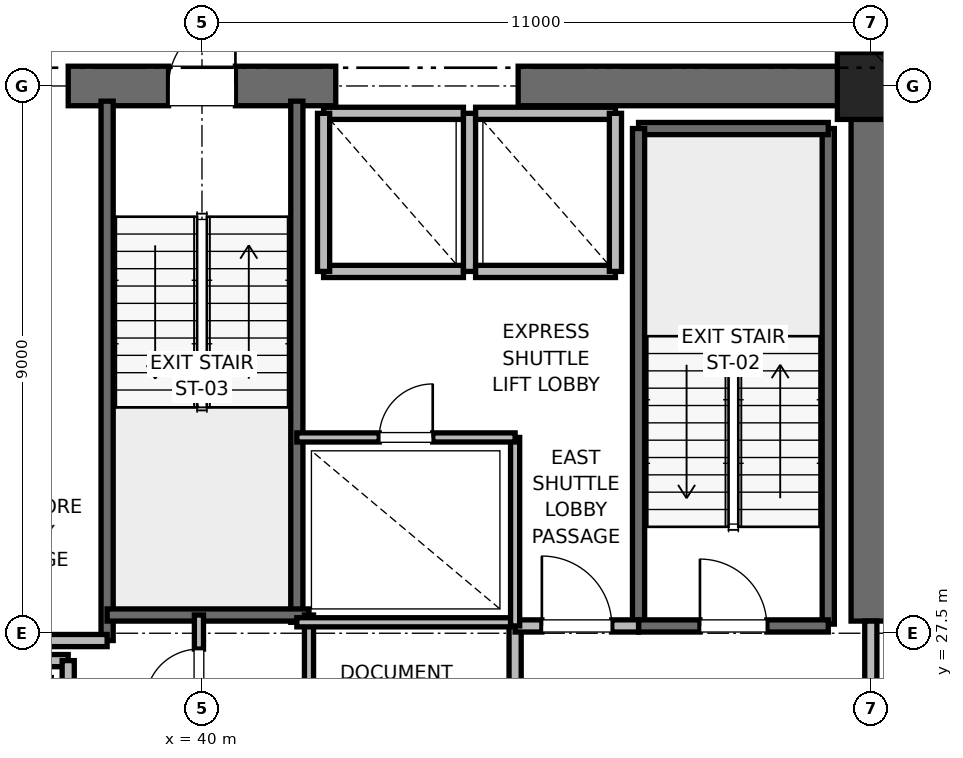
"""IFC4 building model, lengths in metres.
Left out: names, types, materials, properties, quantities, classifications, styles, units other than length and angle.
Written with IfcOpenShell. Run it as: python <this file> out.ifc"""

import sys

from ifc_helpers import new_model, si_unit, direction, frame, frame_2d, origin, origin_2d, place, context, subcontext, project, spatial, rectangle, extrude, element, fill, save


model = new_model("IFC4")
c1 = context("Model", 3, precision=1e-05, world=origin(), true_north=direction((0.0, 1.0)))
c2 = subcontext(c1, "Body", "Model", "MODEL_VIEW")
j1 = project(units=[si_unit("LENGTHUNIT", "METRE"), si_unit("PLANEANGLEUNIT", "RADIAN")], contexts=[c1])
p1 = place(None, origin())
s1 = spatial("IfcSite", under=j1, at=p1, CompositionType="ELEMENT")
p2 = place(p1, origin())
s2 = spatial("IfcBuilding", under=s1, at=p2, CompositionType="ELEMENT")
p3 = place(p2, frame((0.0, 0.0, 55.6)))
s3 = spatial("IfcBuildingStorey", under=s2, at=p3, CompositionType="ELEMENT", Elevation=55.6)
p4 = place(p3, frame((51.0, 36.5, 0.0), z_axis=(0.0, 0.0, 1.0), x_axis=(1.0, 0.0, 0.0)))
e1 = element("IfcColumn", 1, at=p4, inside=s3, PredefinedType="PILASTER", context=c2, shape_type="SweptSolid", body=[
    extrude(rectangle(XDim=1.1, YDim=1.1, at=origin_2d()), origin(), (0.0, 0.0, 1.0), 4.0),
])
p5 = place(p3, frame((37.8, 36.5, 0.0), z_axis=(0.0, 0.0, 1.0), x_axis=(1.0, 0.0, 0.0)))
e2 = element("IfcWall", 2, at=p5, inside=s3, PredefinedType="SHEAR", context=c2, shape_type="SweptSolid", body=[
    extrude(rectangle(XDim=4.4, YDim=0.65, at=frame_2d((2.2, 0.0))), origin(), (0.0, 0.0, 1.0), 3.76),
])
p6 = place(p5, frame((1.65, 0.0, 0.0)))
e3 = element("IfcOpeningElement", 3, at=p6, cuts=e2, PredefinedType="OPENING", context=c2, shape_type="SweptSolid", body=[
    extrude(rectangle(XDim=1.1, YDim=2.15, at=frame_2d((0.55, 1.075))), frame((0.0, 0.325, 0.0), z_axis=(0.0, -1.0, 0.0), x_axis=(1.0, 0.0, 0.0)), (0.0, 0.0, 1.0), 0.65),
])
p7 = place(p3, frame((45.2, 36.5, 0.0), z_axis=(0.0, 0.0, 1.0), x_axis=(1.0, 0.0, 0.0)))
e4 = element("IfcWall", 4, at=p7, inside=s3, PredefinedType="SHEAR", context=c2, shape_type="SweptSolid", body=[
    extrude(rectangle(XDim=5.8, YDim=0.65, at=frame_2d((2.9, 0.0))), origin(), (0.0, 0.0, 1.0), 3.76),
])
p8 = place(p3, frame((51.0, 27.7, 0.0), z_axis=(0.0, 0.0, 1.0), x_axis=(0.0, 1.0, 0.0)))
e5 = element("IfcWall", 5, at=p8, inside=s3, PredefinedType="SHEAR", context=c2, shape_type="SweptSolid", body=[
    extrude(rectangle(XDim=8.8, YDim=0.65, at=frame_2d((4.4, 0.0))), origin(), (0.0, 0.0, 1.0), 3.76),
])
p9 = place(p3, frame((50.3, 27.65, 0.0), z_axis=(0.0, 0.0, 1.0), x_axis=(0.0, 1.0, 0.0)))
e6 = element("IfcWall", 6, at=p9, inside=s3, PredefinedType="SOLIDWALL", context=c2, shape_type="SweptSolid", body=[
    extrude(rectangle(XDim=8.15, YDim=0.2, at=frame_2d((4.075, 0.0))), origin(), (0.0, 0.0, 1.0), 3.76),
])
p10 = place(p3, frame((47.18, 35.8, 0.0), z_axis=(0.0, 0.0, 1.0), x_axis=(1.0, 0.0, 0.0)))
e7 = element("IfcWall", 7, at=p10, inside=s3, PredefinedType="SOLIDWALL", context=c2, shape_type="SweptSolid", body=[
    extrude(rectangle(XDim=3.12, YDim=0.2, at=frame_2d((1.56, 0.0))), origin(), (0.0, 0.0, 1.0), 3.76),
])
p11 = place(p3, frame((47.18, 27.62, 0.0), z_axis=(0.0, 0.0, 1.0), x_axis=(0.0, 1.0, 0.0)))
e8 = element("IfcWall", 8, at=p11, inside=s3, PredefinedType="SOLIDWALL", context=c2, shape_type="SweptSolid", body=[
    extrude(rectangle(XDim=8.18, YDim=0.2, at=frame_2d((4.09, 0.0))), origin(), (0.0, 0.0, 1.0), 3.76),
])
p12 = place(p3, frame((47.18, 27.62, 0.0), z_axis=(0.0, 0.0, 1.0), x_axis=(1.0, 0.0, 0.0)))
e9 = element("IfcWall", 9, at=p12, inside=s3, PredefinedType="SOLIDWALL", context=c2, shape_type="SweptSolid", body=[
    extrude(rectangle(XDim=3.12, YDim=0.2, at=frame_2d((1.56, 0.0))), origin(), (0.0, 0.0, 1.0), 3.76),
])
p13 = place(p12, frame((1.01, 0.0, 0.0)))
e10 = element("IfcOpeningElement", 10, at=p13, cuts=e9, PredefinedType="OPENING", context=c2, shape_type="SweptSolid", body=[
    extrude(rectangle(XDim=1.1, YDim=2.15, at=frame_2d((0.55, 1.075))), frame((0.0, 0.1, 0.0), z_axis=(0.0, -1.0, 0.0), x_axis=(1.0, 0.0, 0.0)), (0.0, 0.0, 1.0), 0.2),
])
p14 = place(p3, frame((38.44, 27.38, 0.0), z_axis=(0.0, 0.0, 1.0), x_axis=(0.0, 1.0, 0.0)))
e11 = element("IfcWall", 11, at=p14, inside=s3, PredefinedType="SOLIDWALL", context=c2, shape_type="SweptSolid", body=[
    extrude(rectangle(XDim=8.87, YDim=0.2, at=frame_2d((4.435, 0.0))), origin(), (0.0, 0.0, 1.0), 3.76),
])
p15 = place(p3, frame((41.56, 27.68, 0.0), z_axis=(0.0, 0.0, 1.0), x_axis=(0.0, 1.0, 0.0)))
e12 = element("IfcWall", 12, at=p15, inside=s3, PredefinedType="SOLIDWALL", context=c2, shape_type="SweptSolid", body=[
    extrude(rectangle(XDim=8.57, YDim=0.2, at=frame_2d((4.285, 0.0))), origin(), (0.0, 0.0, 1.0), 3.76),
])
p16 = place(p3, frame((38.44, 27.8, 0.0), z_axis=(0.0, 0.0, 1.0), x_axis=(1.0, 0.0, 0.0)))
e13 = element("IfcWall", 13, at=p16, inside=s3, PredefinedType="SOLIDWALL", context=c2, shape_type="SweptSolid", body=[
    extrude(rectangle(XDim=3.32, YDim=0.2, at=frame_2d((1.66, 0.0))), origin(), (0.0, 0.0, 1.0), 3.76),
])
p17 = place(p3, frame((32.82, 27.38, 0.0), z_axis=(0.0, 0.0, 1.0), x_axis=(1.0, 0.0, 0.0)))
e14 = element("IfcWall", 14, at=p17, inside=s3, PredefinedType="PARTITIONING", context=c2, shape_type="SweptSolid", body=[
    extrude(rectangle(XDim=5.62, YDim=0.2, at=frame_2d((2.81, 0.0))), origin(), (0.0, 0.0, 1.0), 3.76),
])
p18 = place(p3, frame((45.15, 24.25, 0.0), z_axis=(0.0, 0.0, 1.0), x_axis=(0.0, 1.0, 0.0)))
e15 = element("IfcWall", 15, at=p18, inside=s3, PredefinedType="PARTITIONING", context=c2, shape_type="SweptSolid", body=[
    extrude(rectangle(XDim=3.37, YDim=0.2, at=frame_2d((1.685, 0.0))), origin(), (0.0, 0.0, 1.0), 3.76),
])
p19 = place(p3, frame((45.15, 27.62, 0.0), z_axis=(0.0, 0.0, 1.0), x_axis=(1.0, 0.0, 0.0)))
e16 = element("IfcWall", 16, at=p19, inside=s3, PredefinedType="PARTITIONING", context=c2, shape_type="SweptSolid", body=[
    extrude(rectangle(XDim=2.03, YDim=0.2, at=frame_2d((1.015, 0.0))), origin(), (0.0, 0.0, 1.0), 3.76),
])
p20 = place(p19, frame((0.44, 0.0, 0.0)))
e17 = element("IfcOpeningElement", 17, at=p20, cuts=e16, PredefinedType="OPENING", context=c2, shape_type="SweptSolid", body=[
    extrude(rectangle(XDim=1.15, YDim=2.2, at=frame_2d((0.575, 1.1))), frame((0.0, 0.1, 0.0), z_axis=(0.0, -1.0, 0.0), x_axis=(1.0, 0.0, 0.0)), (0.0, 0.0, 1.0), 0.2),
])
p21 = place(p3, frame((51.0, 24.3, 0.0), z_axis=(0.0, 0.0, 1.0), x_axis=(0.0, 1.0, 0.0)))
e18 = element("IfcWall", 18, at=p21, inside=s3, PredefinedType="PARTITIONING", context=c2, shape_type="SweptSolid", body=[
    extrude(rectangle(XDim=3.4, YDim=0.2, at=frame_2d((1.7, 0.0))), origin(), (0.0, 0.0, 1.0), 2.54),
])
p22 = place(p21, frame((1.125, 0.0, 0.0)))
e19 = element("IfcOpeningElement", 19, at=p22, cuts=e18, PredefinedType="OPENING", context=c2, shape_type="SweptSolid", body=[
    extrude(rectangle(XDim=1.15, YDim=2.2, at=frame_2d((0.575, 1.1))), frame((0.0, 0.1, 0.0), z_axis=(0.0, -1.0, 0.0), x_axis=(1.0, 0.0, 0.0)), (0.0, 0.0, 1.0), 0.2),
])
p23 = place(p3, frame((37.8, 27.05, 0.0), z_axis=(0.0, 0.0, 1.0), x_axis=(-1.0, 0.0, 0.0)))
e20 = element("IfcWall", 20, at=p23, inside=s3, PredefinedType="SOLIDWALL", context=c2, shape_type="SweptSolid", body=[
    extrude(rectangle(XDim=2.3, YDim=0.2, at=frame_2d((1.15, 0.0))), origin(), (0.0, 0.0, 1.0), 3.76),
])
p24 = place(p3, frame((37.8, 24.45, 0.0), z_axis=(0.0, 0.0, 1.0), x_axis=(0.0, 1.0, 0.0)))
e21 = element("IfcWall", 21, at=p24, inside=s3, PredefinedType="SOLIDWALL", context=c2, shape_type="SweptSolid", body=[
    extrude(rectangle(XDim=2.6, YDim=0.2, at=frame_2d((1.3, 0.0))), origin(), (0.0, 0.0, 1.0), 3.76),
])
p25 = place(p3, frame((42.0, 33.45, 0.0), z_axis=(0.0, 0.0, 1.0), x_axis=(1.0, 0.0, 0.0)))
e22 = element("IfcWall", 22, at=p25, inside=s3, PredefinedType="SOLIDWALL", context=c2, shape_type="SweptSolid", body=[
    extrude(rectangle(XDim=2.3, YDim=0.2, at=frame_2d((1.15, 0.0))), origin(), (0.0, 0.0, 1.0), 3.76),
])
p26 = place(p3, frame((44.3, 36.05, 0.0), z_axis=(0.0, 0.0, 1.0), x_axis=(-1.0, 0.0, 0.0)))
e23 = element("IfcWall", 23, at=p26, inside=s3, PredefinedType="SOLIDWALL", context=c2, shape_type="SweptSolid", body=[
    extrude(rectangle(XDim=2.3, YDim=0.2, at=frame_2d((1.15, 0.0))), origin(), (0.0, 0.0, 1.0), 2.54),
])
for number, where, z_axis, x_axis in (
    (24, (42.0, 36.05, 0.0), (0.0, 0.0, 1.0), (0.0, -1.0, 0.0)),
    (25, (44.4, 33.45, 0.0), (0.0, 0.0, 1.0), (0.0, 1.0, 0.0)),
):
    element("IfcWall", number, at=place(p3, frame(where, z_axis=z_axis, x_axis=x_axis)), inside=s3, PredefinedType="SOLIDWALL", context=c2, shape_type="SweptSolid", body=[
        extrude(rectangle(XDim=2.6, YDim=0.2, at=frame_2d((1.3, 0.0))), origin(), (0.0, 0.0, 1.0), 2.54),
    ])
p27 = place(p3, frame((44.5, 33.45, 0.0), z_axis=(0.0, 0.0, 1.0), x_axis=(1.0, 0.0, 0.0)))
e26 = element("IfcWall", 26, at=p27, inside=s3, PredefinedType="SOLIDWALL", context=c2, shape_type="SweptSolid", body=[
    extrude(rectangle(XDim=2.3, YDim=0.2, at=frame_2d((1.15, 0.0))), origin(), (0.0, 0.0, 1.0), 3.76),
])
p28 = place(p3, frame((46.8, 36.05, 0.0), z_axis=(0.0, 0.0, 1.0), x_axis=(-1.0, 0.0, 0.0)))
e27 = element("IfcWall", 27, at=p28, inside=s3, PredefinedType="SOLIDWALL", context=c2, shape_type="SweptSolid", body=[
    extrude(rectangle(XDim=2.3, YDim=0.2, at=frame_2d((1.15, 0.0))), origin(), (0.0, 0.0, 1.0), 2.54),
])
p29 = place(p3, frame((46.8, 33.45, 0.0), z_axis=(0.0, 0.0, 1.0), x_axis=(0.0, 1.0, 0.0)))
e28 = element("IfcWall", 28, at=p29, inside=s3, PredefinedType="SOLIDWALL", context=c2, shape_type="SweptSolid", body=[
    extrude(rectangle(XDim=2.6, YDim=0.2, at=frame_2d((1.3, 0.0))), origin(), (0.0, 0.0, 1.0), 3.76),
])
p30 = place(p3, frame((41.76, 23.8, 0.0), z_axis=(0.0, 0.0, 1.0), x_axis=(0.0, 1.0, 0.0)))
e29 = element("IfcWall", 29, at=p30, inside=s3, PredefinedType="PARTITIONING", context=c2, shape_type="SweptSolid", body=[
    extrude(rectangle(XDim=4.0, YDim=0.15, at=frame_2d((2.0, 0.0))), origin(), (0.0, 0.0, 1.0), 2.85),
])
p31 = place(p3, frame((39.95, 25.8, 0.0), z_axis=(0.0, 0.0, 1.0), x_axis=(0.0, 1.0, 0.0)))
e30 = element("IfcWall", 30, at=p31, inside=s3, PredefinedType="PARTITIONING", context=c2, shape_type="SweptSolid", body=[
    extrude(rectangle(XDim=2.0, YDim=0.15, at=frame_2d((1.0, 0.0))), origin(), (0.0, 0.0, 1.0), 2.85),
])
p32 = place(p31, frame((0.56, 0.0, 0.0)))
e31 = element("IfcOpeningElement", 31, at=p32, cuts=e30, PredefinedType="OPENING", context=c2, shape_type="SweptSolid", body=[
    extrude(rectangle(XDim=0.88, YDim=2.1, at=frame_2d((0.44, 1.05))), frame((0.0, 0.075, 0.0), z_axis=(0.0, -1.0, 0.0), x_axis=(1.0, 0.0, 0.0)), (0.0, 0.0, 1.0), 0.15),
])
p33 = place(p3, frame((41.56, 27.68, 0.0), z_axis=(0.0, 0.0, 1.0), x_axis=(1.0, 0.0, 0.0)))
e32 = element("IfcWall", 32, at=p33, inside=s3, PredefinedType="PARTITIONING", context=c2, shape_type="SweptSolid", body=[
    extrude(rectangle(XDim=3.59, YDim=0.15, at=frame_2d((1.795, 0.0))), origin(), (0.0, 0.0, 1.0), 2.85),
])
p34 = place(p3, frame((45.15, 27.62, 0.0), z_axis=(0.0, 0.0, 1.0), x_axis=(0.0, 1.0, 0.0)))
e33 = element("IfcWall", 33, at=p34, inside=s3, PredefinedType="PARTITIONING", context=c2, shape_type="SweptSolid", body=[
    extrude(rectangle(XDim=3.1, YDim=0.15, at=frame_2d((1.55, 0.0))), origin(), (0.0, 0.0, 1.0), 2.85),
])
p35 = place(p3, frame((41.56, 30.72, 0.0), z_axis=(0.0, 0.0, 1.0), x_axis=(1.0, 0.0, 0.0)))
e34 = element("IfcWall", 34, at=p35, inside=s3, PredefinedType="PARTITIONING", context=c2, shape_type="SweptSolid", body=[
    extrude(rectangle(XDim=3.59, YDim=0.15, at=frame_2d((1.795, 0.0))), origin(), (0.0, 0.0, 1.0), 2.85),
])
p36 = place(p35, frame((1.355, 0.0, 0.0)))
e35 = element("IfcOpeningElement", 35, at=p36, cuts=e34, PredefinedType="OPENING", context=c2, shape_type="SweptSolid", body=[
    extrude(rectangle(XDim=0.88, YDim=2.1, at=frame_2d((0.44, 1.05))), frame((0.0, 0.075, 0.0), z_axis=(0.0, -1.0, 0.0), x_axis=(1.0, 0.0, 0.0)), (0.0, 0.0, 1.0), 0.15),
])
p37 = place(p13, origin())
e36 = element("IfcDoor", 36, at=p37, inside=s3, OperationType="SINGLE_SWING_LEFT", PredefinedType="DOOR", context=c2, shape_type="SweptSolid", body=[
    extrude(rectangle(XDim=1.1, YDim=2.15, at=frame_2d((0.55, 1.075))), frame((0.0, 0.025, 0.0), z_axis=(0.0, -1.0, 0.0), x_axis=(1.0, 0.0, 0.0)), (0.0, 0.0, 1.0), 0.05),
])
fill(e10, e36)
p38 = place(p6, origin())
e37 = element("IfcDoor", 37, at=p38, inside=s3, OperationType="SINGLE_SWING_RIGHT", PredefinedType="DOOR", context=c2, shape_type="SweptSolid", body=[
    extrude(rectangle(XDim=1.1, YDim=2.15, at=frame_2d((0.55, 1.075))), frame((0.0, 0.025, 0.0), z_axis=(0.0, -1.0, 0.0), x_axis=(1.0, 0.0, 0.0)), (0.0, 0.0, 1.0), 0.05),
])
fill(e3, e37)
p39 = place(p20, origin())
e38 = element("IfcDoor", 38, at=p39, inside=s3, OperationType="SINGLE_SWING_LEFT", PredefinedType="DOOR", context=c2, shape_type="SweptSolid", body=[
    extrude(rectangle(XDim=1.15, YDim=2.2, at=frame_2d((0.575, 1.1))), frame((0.0, 0.025, 0.0), z_axis=(0.0, -1.0, 0.0), x_axis=(1.0, 0.0, 0.0)), (0.0, 0.0, 1.0), 0.05),
])
fill(e17, e38)
p40 = place(p32, origin())
e39 = element("IfcDoor", 39, at=p40, inside=s3, OperationType="SINGLE_SWING_LEFT", PredefinedType="DOOR", context=c2, shape_type="SweptSolid", body=[
    extrude(rectangle(XDim=0.88, YDim=2.1, at=frame_2d((0.44, 1.05))), frame((0.0, 0.025, 0.0), z_axis=(0.0, -1.0, 0.0), x_axis=(1.0, 0.0, 0.0)), (0.0, 0.0, 1.0), 0.05),
])
fill(e31, e39)
p41 = place(p36, origin())
e40 = element("IfcDoor", 40, at=p41, inside=s3, OperationType="SINGLE_SWING_RIGHT", PredefinedType="DOOR", context=c2, shape_type="SweptSolid", body=[
    extrude(rectangle(XDim=0.88, YDim=2.1, at=frame_2d((0.44, 1.05))), frame((0.0, 0.025, 0.0), z_axis=(0.0, -1.0, 0.0), x_axis=(1.0, 0.0, 0.0)), (0.0, 0.0, 1.0), 0.05),
])
fill(e35, e40)
save(model, sys.argv[1])
